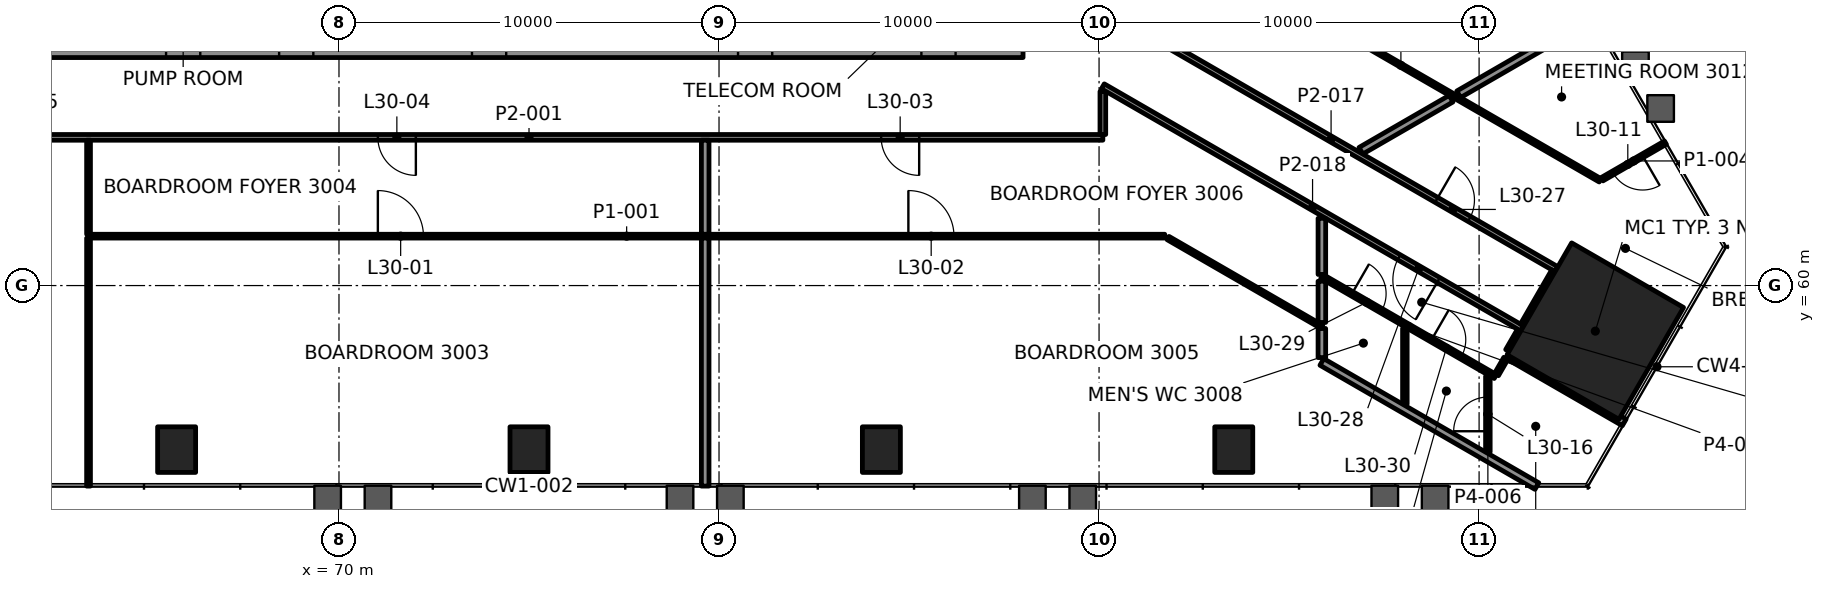
"""IFC4 building model, lengths in metres.
Left out: names, types, materials, properties, quantities, classifications, styles, units other than length and angle.
Written with IfcOpenShell. Run it as: python <this file> out.ifc"""

import sys

from ifc_helpers import new_model, si_unit, direction, frame, frame_2d, origin, origin_2d, place, context, subcontext, project, spatial, rectangle, extrude, element, fill, save


model = new_model("IFC4")
c1 = context("Model", 3, precision=1e-05, world=origin(), true_north=direction((0.0, 1.0)))
c2 = subcontext(c1, "Body", "Model", "MODEL_VIEW")
j1 = project(units=[si_unit("LENGTHUNIT", "METRE"), si_unit("PLANEANGLEUNIT", "RADIAN")], contexts=[c1])
p1 = place(None, origin())
s1 = spatial("IfcSite", under=j1, at=p1, CompositionType="ELEMENT")
p2 = place(p1, origin())
s2 = spatial("IfcBuilding", under=s1, at=p2, CompositionType="ELEMENT")
p3 = place(p2, frame((0.0, 0.0, 132.4)))
s3 = spatial("IfcBuildingStorey", under=s2, at=p3, CompositionType="ELEMENT", Elevation=132.4)
p4 = place(p3, frame((103.058, 58.801, 0.0), z_axis=(0.0, 0.0, 1.0), x_axis=(0.5, 0.866025403784, 0.0)))
e1 = element("IfcColumn", 1, at=p4, inside=s3, PredefinedType="COLUMN", context=c2, shape_type="SweptSolid", body=[
    extrude(rectangle(XDim=3.4, YDim=3.4, at=origin_2d()), origin(), (0.0, 0.0, 1.0), 4.2),
])
for number, where, z_axis, x_axis in (
    (2, (65.728, 55.683, -0.0), (0.0, 0.0, 1.0), (1.0, 0.0, 0.0)),
    (3, (75.0, 55.683, -0.0), (0.0, 0.0, 1.0), (1.0, 0.0, 0.0)),
    (4, (84.272, 55.683, -0.0), (0.0, 0.0, 1.0), (1.0, 0.0, 0.0)),
    (5, (93.545, 55.683, -0.0), (0.0, 0.0, 1.0), (1.0, 0.0, 0.0)),
):
    element("IfcColumn", number, at=place(p3, frame(where, z_axis=z_axis, x_axis=x_axis)), inside=s3, PredefinedType="COLUMN", context=c2, shape_type="SweptSolid", body=[
        extrude(rectangle(XDim=1.0, YDim=1.2, at=origin_2d()), origin(), (0.0, 0.0, 1.0), 4.2),
    ])
p5 = place(p3, frame((62.0, 66.45, 0.0), z_axis=(0.0, 0.0, 1.0), x_axis=(1.0, 0.0, 0.0)))
e6 = element("IfcWall", 6, at=p5, inside=s3, PredefinedType="SHEAR", context=c2, shape_type="SweptSolid", body=[
    extrude(rectangle(XDim=26.0, YDim=0.9, at=frame_2d((13.0, 0.0))), origin(), (0.0, 0.0, 1.0), 4.0),
])
p6 = place(p5, frame((3.45, 0.0, 0.0)))
e7 = element("IfcOpeningElement", 7, at=p6, cuts=e6, PredefinedType="OPENING", context=c2, shape_type="SweptSolid", body=[
    extrude(rectangle(XDim=0.9, YDim=2.1, at=frame_2d((0.45, 1.05))), frame((0.0, 0.46, 0.0), z_axis=(0.0, -1.0, 0.0), x_axis=(1.0, 0.0, 0.0)), (0.0, 0.0, 1.0), 0.92),
])
p7 = place(p5, frame((6.425, 0.0, 0.0)))
e8 = element("IfcOpeningElement", 8, at=p7, cuts=e6, PredefinedType="OPENING", context=c2, shape_type="SweptSolid", body=[
    extrude(rectangle(XDim=0.9, YDim=2.1, at=frame_2d((0.45, 1.05))), frame((0.0, 0.46, 0.0), z_axis=(0.0, -1.0, 0.0), x_axis=(1.0, 0.0, 0.0)), (0.0, 0.0, 1.0), 0.92),
])
p8 = place(p5, frame((11.5, 0.0, 0.0)))
e9 = element("IfcOpeningElement", 9, at=p8, cuts=e6, PredefinedType="OPENING", context=c2, shape_type="SweptSolid", body=[
    extrude(rectangle(XDim=0.9, YDim=2.1, at=frame_2d((0.45, 1.05))), frame((0.0, 0.46, 0.0), z_axis=(0.0, -1.0, 0.0), x_axis=(1.0, 0.0, 0.0)), (0.0, 0.0, 1.0), 0.92),
])
p9 = place(p5, frame((18.5, 0.0, 0.0)))
e10 = element("IfcOpeningElement", 10, at=p9, cuts=e6, PredefinedType="OPENING", context=c2, shape_type="SweptSolid", body=[
    extrude(rectangle(XDim=0.9, YDim=2.1, at=frame_2d((0.45, 1.05))), frame((0.0, 0.46, 0.0), z_axis=(0.0, -1.0, 0.0), x_axis=(1.0, 0.0, 0.0)), (0.0, 0.0, 1.0), 0.92),
])
p10 = place(p5, frame((23.325, 0.0, 0.0)))
e11 = element("IfcOpeningElement", 11, at=p10, cuts=e6, PredefinedType="OPENING", context=c2, shape_type="SweptSolid", body=[
    extrude(rectangle(XDim=0.9, YDim=2.1, at=frame_2d((0.45, 1.05))), frame((0.0, 0.46, 0.0), z_axis=(0.0, -1.0, 0.0), x_axis=(1.0, 0.0, 0.0)), (0.0, 0.0, 1.0), 0.92),
])
p11 = place(p3, frame((63.41, 61.3, 0.0), z_axis=(0.0, 0.0, 1.0), x_axis=(1.0, 0.0, 0.0)))
e12 = element("IfcWall", 12, at=p11, inside=s3, PredefinedType="PARTITIONING", context=c2, shape_type="SweptSolid", body=[
    extrude(rectangle(XDim=28.319, YDim=0.1, at=frame_2d((14.16, 0.0))), origin(), (0.0, 0.0, 1.0), 3.4),
])
p12 = place(p11, frame((7.613, 0.0, 0.0)))
e13 = element("IfcOpeningElement", 13, at=p12, cuts=e12, PredefinedType="OPENING", context=c2, shape_type="SweptSolid", body=[
    extrude(rectangle(XDim=1.2, YDim=2.1, at=frame_2d((0.6, 1.05))), frame((0.0, 0.06, 0.0), z_axis=(0.0, -1.0, 0.0), x_axis=(1.0, 0.0, 0.0)), (0.0, 0.0, 1.0), 0.12),
])
p13 = place(p11, frame((21.573, 0.0, 0.0)))
e14 = element("IfcOpeningElement", 14, at=p13, cuts=e12, PredefinedType="OPENING", context=c2, shape_type="SweptSolid", body=[
    extrude(rectangle(XDim=1.2, YDim=2.1, at=frame_2d((0.6, 1.05))), frame((0.0, 0.06, 0.0), z_axis=(0.0, -1.0, 0.0), x_axis=(1.0, 0.0, 0.0)), (0.0, 0.0, 1.0), 0.12),
])
p14 = place(p3, frame((90.1, 63.9, 0.0), z_axis=(0.0, 0.0, 1.0), x_axis=(-1.0, 0.0, 0.0)))
e15 = element("IfcWall", 15, at=p14, inside=s3, PredefinedType="PARTITIONING", context=c2, shape_type="SweptSolid", body=[
    extrude(rectangle(XDim=30.2, YDim=0.15, at=frame_2d((15.1, 0.0))), origin(), (0.0, 0.0, 1.0), 3.4),
])
p15 = place(p14, frame((4.833, 0.0, 0.0)))
e16 = element("IfcOpeningElement", 16, at=p15, cuts=e15, PredefinedType="OPENING", context=c2, shape_type="SweptSolid", body=[
    extrude(rectangle(XDim=1.0, YDim=2.1, at=frame_2d((0.5, 1.05))), frame((0.0, 0.085, 0.0), z_axis=(0.0, -1.0, 0.0), x_axis=(1.0, 0.0, 0.0)), (0.0, 0.0, 1.0), 0.17),
])
p16 = place(p14, frame((18.077, 0.0, 0.0)))
e17 = element("IfcOpeningElement", 17, at=p16, cuts=e15, PredefinedType="OPENING", context=c2, shape_type="SweptSolid", body=[
    extrude(rectangle(XDim=1.0, YDim=2.1, at=frame_2d((0.5, 1.05))), frame((0.0, 0.085, 0.0), z_axis=(0.0, -1.0, 0.0), x_axis=(1.0, 0.0, 0.0)), (0.0, 0.0, 1.0), 0.17),
])
p17 = place(p14, frame((27.893, 0.0, 0.0)))
e18 = element("IfcOpeningElement", 18, at=p17, cuts=e15, PredefinedType="OPENING", context=c2, shape_type="SweptSolid", body=[
    extrude(rectangle(XDim=0.9, YDim=2.1, at=frame_2d((0.45, 1.05))), frame((0.0, 0.085, 0.0), z_axis=(0.0, -1.0, 0.0), x_axis=(1.0, 0.0, 0.0)), (0.0, 0.0, 1.0), 0.17),
])
p18 = place(p3, frame((104.903, 63.761, 0.0), z_axis=(0.0, 0.0, 1.0), x_axis=(-0.86605048973, -0.49995654735, 0.0)))
e19 = element("IfcWall", 19, at=p18, inside=s3, PredefinedType="PARTITIONING", context=c2, shape_type="SweptSolid", body=[
    extrude(rectangle(XDim=1.926, YDim=0.1, at=frame_2d((0.963, 0.0))), origin(), (0.0, 0.0, 1.0), 3.4),
])
p19 = place(p18, frame((0.693, 0.0, 0.0)))
e20 = element("IfcOpeningElement", 20, at=p19, cuts=e19, PredefinedType="OPENING", context=c2, shape_type="SweptSolid", body=[
    extrude(rectangle(XDim=0.9, YDim=2.1, at=frame_2d((0.45, 1.05))), frame((0.0, 0.06, 0.0), z_axis=(0.0, -1.0, 0.0), x_axis=(1.0, 0.0, 0.0)), (0.0, 0.0, 1.0), 0.12),
])
p20 = place(p3, frame((96.89, 63.548, 0.0), z_axis=(0.0, 0.0, 1.0), x_axis=(0.86604168154, 0.499971805041, 0.0)))
e21 = element("IfcWall", 21, at=p20, inside=s3, PredefinedType="PARTITIONING", context=c2, shape_type="SweptSolid", body=[
    extrude(rectangle(XDim=2.74, YDim=0.2, at=frame_2d((1.37, 0.0))), origin(), (0.0, 0.0, 1.0), 3.4),
])
p21 = place(p3, frame((100.458, 57.658, 0.0), z_axis=(0.0, 0.0, 1.0), x_axis=(0.499895202697, 0.866085900082, 0.0)))
e22 = element("IfcWall", 22, at=p21, inside=s3, PredefinedType="PARTITIONING", context=c2, shape_type="SweptSolid", body=[
    extrude(rectangle(XDim=0.489, YDim=0.12, at=frame_2d((0.245, 0.0))), origin(), (0.0, 0.0, 1.0), 3.4),
])
p22 = place(p3, frame((100.786, 58.265, 0.0), z_axis=(0.0, 0.0, 1.0), x_axis=(0.499880341542, 0.866094477606, 0.0)))
e23 = element("IfcWall", 23, at=p22, inside=s3, PredefinedType="PARTITIONING", context=c2, shape_type="SweptSolid", body=[
    extrude(rectangle(XDim=0.625, YDim=0.2, at=frame_2d((0.312, 0.0))), origin(), (0.0, 0.0, 1.0), 3.4),
])
p23 = place(p3, frame((100.231, 55.623, 0.0), z_axis=(0.0, 0.0, 1.0), x_axis=(0.0, 1.0, 0.0)))
e24 = element("IfcWall", 24, at=p23, inside=s3, PredefinedType="PARTITIONING", context=c2, shape_type="SweptSolid", body=[
    extrude(rectangle(XDim=1.987, YDim=0.12, at=frame_2d((0.993, 0.0))), origin(), (0.0, 0.0, 1.0), 3.4),
])
p24 = place(p23, frame((0.543, 0.0, 0.0)))
e25 = element("IfcOpeningElement", 25, at=p24, cuts=e24, PredefinedType="OPENING", context=c2, shape_type="SweptSolid", body=[
    extrude(rectangle(XDim=0.9, YDim=2.1, at=frame_2d((0.45, 1.05))), frame((0.0, 0.07, 0.0), z_axis=(0.0, -1.0, 0.0), x_axis=(1.0, 0.0, 0.0)), (0.0, 0.0, 1.0), 0.14),
])
p25 = place(p3, frame((98.047, 56.884, 0.0), z_axis=(0.0, 0.0, 1.0), x_axis=(0.0, 1.0, 0.0)))
e26 = element("IfcWall", 26, at=p25, inside=s3, PredefinedType="PARTITIONING", context=c2, shape_type="SweptSolid", body=[
    extrude(rectangle(XDim=1.987, YDim=0.12, at=frame_2d((0.993, 0.0))), origin(), (0.0, 0.0, 1.0), 3.4),
])
p26 = place(p3, frame((95.863, 58.105, 0.0), z_axis=(0.0, 0.0, 1.0), x_axis=(0.0, 1.0, 0.0)))
e27 = element("IfcWall", 27, at=p26, inside=s3, PredefinedType="PARTITIONING", context=c2, shape_type="SweptSolid", body=[
    extrude(rectangle(XDim=0.765, YDim=0.2, at=frame_2d((0.383, 0.0))), origin(), (0.0, 0.0, 1.0), 3.4),
])
p27 = place(p3, frame((90.1, 63.975, 0.0), z_axis=(0.0, 0.0, 1.0), x_axis=(0.0, 1.0, 0.0)))
e28 = element("IfcWall", 28, at=p27, inside=s3, PredefinedType="PARTITIONING", context=c2, shape_type="SweptSolid", body=[
    extrude(rectangle(XDim=1.131, YDim=0.15, at=frame_2d((0.565, 0.0))), origin(), (0.0, 0.0, 1.0), 3.247),
])
p28 = place(p3, frame((79.636, 54.723, 0.0), z_axis=(0.0, 0.0, 1.0), x_axis=(0.0, 1.0, 0.0)))
e29 = element("IfcWall", 29, at=p28, inside=s3, PredefinedType="PARTITIONING", context=c2, shape_type="SweptSolid", body=[
    extrude(rectangle(XDim=6.527, YDim=0.2, at=frame_2d((3.264, 0.0))), origin(), (0.0, 0.0, 1.0), 3.165),
])
p29 = place(p3, frame((63.41, 54.723, 0.0), z_axis=(0.0, 0.0, 1.0), x_axis=(0.0, 1.0, 0.0)))
e30 = element("IfcWall", 30, at=p29, inside=s3, PredefinedType="PARTITIONING", context=c2, shape_type="SweptSolid", body=[
    extrude(rectangle(XDim=6.527, YDim=0.1, at=frame_2d((3.264, 0.0))), origin(), (0.0, 0.0, 1.0), 3.165),
])
p30 = place(p3, frame((103.185, 62.769, 0.0), z_axis=(0.0, 0.0, 1.0), x_axis=(-0.866024396652, 0.5000017444, 0.0)))
e31 = element("IfcWall", 31, at=p30, inside=s3, PredefinedType="PARTITIONING", context=c2, shape_type="SweptSolid", body=[
    extrude(rectangle(XDim=12.107, YDim=0.1, at=frame_2d((6.053, 0.0))), origin(), (0.0, 0.0, 1.0), 3.4),
])
p31 = place(p3, frame((90.175, 67.278, 0.0), z_axis=(0.0, 0.0, 1.0), x_axis=(0.866022903348, -0.500004330858, 0.0)))
e32 = element("IfcWall", 32, at=p31, inside=s3, PredefinedType="PARTITIONING", context=c2, shape_type="SweptSolid", body=[
    extrude(rectangle(XDim=13.695, YDim=0.15, at=frame_2d((6.848, 0.0))), origin(), (0.0, 0.0, 1.0), 3.4),
])
p32 = place(p31, frame((10.05, 0.0, 0.0)))
e33 = element("IfcOpeningElement", 33, at=p32, cuts=e32, PredefinedType="OPENING", context=c2, shape_type="SweptSolid", body=[
    extrude(rectangle(XDim=1.0, YDim=2.1, at=frame_2d((0.5, 1.05))), frame((0.0, 0.085, 0.0), z_axis=(0.0, -1.0, 0.0), x_axis=(1.0, 0.0, 0.0)), (0.0, 0.0, 1.0), 0.17),
])
p33 = place(p3, frame((101.136, 58.871, 0.0), z_axis=(0.0, 0.0, 1.0), x_axis=(-0.866020317169, 0.500008810174, 0.0)))
e34 = element("IfcWall", 34, at=p33, inside=s3, PredefinedType="PARTITIONING", context=c2, shape_type="SweptSolid", body=[
    extrude(rectangle(XDim=12.743, YDim=0.15, at=frame_2d((6.372, 0.0))), origin(), (0.0, 0.0, 1.0), 3.247),
])
p34 = place(p33, frame((2.546, 0.0, 0.0)))
e35 = element("IfcOpeningElement", 35, at=p34, cuts=e34, PredefinedType="OPENING", context=c2, shape_type="SweptSolid", body=[
    extrude(rectangle(XDim=1.2, YDim=2.1, at=frame_2d((0.6, 1.05))), frame((0.0, 0.085, 0.0), z_axis=(0.0, -1.0, 0.0), x_axis=(1.0, 0.0, 0.0)), (0.0, 0.0, 1.0), 0.17),
])
p35 = place(p3, frame((103.819, 56.398, 0.0), z_axis=(0.0, 0.0, 1.0), x_axis=(-0.866004308173, 0.500036536891, 0.0)))
e36 = element("IfcWall", 36, at=p35, inside=s3, PredefinedType="PARTITIONING", context=c2, shape_type="SweptSolid", body=[
    extrude(rectangle(XDim=3.544, YDim=0.2, at=frame_2d((1.772, 0.0))), origin(), (0.0, 0.0, 1.0), 3.4),
])
p36 = place(p3, frame((95.863, 60.241, 0.0), z_axis=(0.0, 0.0, 1.0), x_axis=(0.866028224559, -0.499995114243, 0.0)))
e37 = element("IfcWall", 37, at=p36, inside=s3, PredefinedType="PARTITIONING", context=c2, shape_type="SweptSolid", body=[
    extrude(rectangle(XDim=5.271, YDim=0.12, at=frame_2d((2.635, 0.0))), origin(), (0.0, 0.0, 1.0), 3.4),
])
p37 = place(p36, frame((0.913, 0.0, 0.0)))
e38 = element("IfcOpeningElement", 38, at=p37, cuts=e37, PredefinedType="OPENING", context=c2, shape_type="SweptSolid", body=[
    extrude(rectangle(XDim=0.9, YDim=2.1, at=frame_2d((0.45, 1.05))), frame((0.0, 0.07, 0.0), z_axis=(0.0, -1.0, 0.0), x_axis=(1.0, 0.0, 0.0)), (0.0, 0.0, 1.0), 0.14),
])
p38 = place(p36, frame((3.333, 0.0, 0.0)))
e39 = element("IfcOpeningElement", 39, at=p38, cuts=e37, PredefinedType="OPENING", context=c2, shape_type="SweptSolid", body=[
    extrude(rectangle(XDim=0.9, YDim=2.1, at=frame_2d((0.45, 1.05))), frame((0.0, 0.07, 0.0), z_axis=(0.0, -1.0, 0.0), x_axis=(1.0, 0.0, 0.0)), (0.0, 0.0, 1.0), 0.14),
])
p39 = place(p3, frame((95.863, 58.914, 0.0), z_axis=(0.0, 0.0, 1.0), x_axis=(-0.866042039906, 0.499971184285, 0.0)))
e40 = element("IfcWall", 40, at=p39, inside=s3, PredefinedType="PARTITIONING", context=c2, shape_type="SweptSolid", body=[
    extrude(rectangle(XDim=4.673, YDim=0.1, at=frame_2d((2.336, 0.0))), origin(), (0.0, 0.0, 1.0), 3.4),
])
p40 = place(p3, frame((101.521, 54.723, 0.0), z_axis=(0.0, 0.0, 1.0), x_axis=(-0.866020061583, 0.50000925285, 0.0)))
e41 = element("IfcWall", 41, at=p40, inside=s3, PredefinedType="PARTITIONING", context=c2, shape_type="SweptSolid", body=[
    extrude(rectangle(XDim=6.534, YDim=0.2, at=frame_2d((3.267, 0.0))), origin(), (0.0, 0.0, 1.0), 3.4),
])
p41 = place(p3, frame((79.636, 61.35, 0.0), z_axis=(0.0, 0.0, 1.0), x_axis=(0.0, 1.0, 0.0)))
e42 = element("IfcWall", 42, at=p41, inside=s3, PredefinedType="PARTITIONING", context=c2, shape_type="SweptSolid", body=[
    extrude(rectangle(XDim=2.475, YDim=0.2, at=frame_2d((1.237, 0.0))), origin(), (0.0, 0.0, 1.0), 3.4),
])
p42 = place(p3, frame((99.463, 65.033, 0.0), z_axis=(0.0, 0.0, 1.0), x_axis=(0.866014978466, 0.500018056747, 0.0)))
e43 = element("IfcWall", 43, at=p42, inside=s3, PredefinedType="PARTITIONING", context=c2, shape_type="SweptSolid", body=[
    extrude(rectangle(XDim=4.075, YDim=0.2, at=frame_2d((2.038, 0.0))), origin(), (0.0, 0.0, 1.0), 3.4),
])
p43 = place(p3, frame((101.174, 58.936, 0.0), z_axis=(0.0, 0.0, 1.0), x_axis=(0.499991515992, 0.866030301974, 0.0)))
e44 = element("IfcWall", 44, at=p43, inside=s3, PredefinedType="PARTITIONING", context=c2, shape_type="SweptSolid", body=[
    extrude(rectangle(XDim=1.649, YDim=0.2, at=frame_2d((0.825, 0.0))), origin(), (0.0, 0.0, 1.0), 3.247),
])
p44 = place(p3, frame((95.863, 60.293, 0.0), z_axis=(0.0, 0.0, 1.0), x_axis=(0.0, 1.0, 0.0)))
e45 = element("IfcWall", 45, at=p44, inside=s3, PredefinedType="PARTITIONING", context=c2, shape_type="SweptSolid", body=[
    extrude(rectangle(XDim=1.476, YDim=0.2, at=frame_2d((0.738, 0.0))), origin(), (0.0, 0.0, 1.0), 3.4),
])
p45 = place(p3, frame((63.41, 61.35, 0.0), z_axis=(0.0, 0.0, 1.0), x_axis=(0.0, 1.0, 0.0)))
e46 = element("IfcWall", 46, at=p45, inside=s3, PredefinedType="PARTITIONING", context=c2, shape_type="SweptSolid", body=[
    extrude(rectangle(XDim=2.475, YDim=0.1, at=frame_2d((1.237, 0.0))), origin(), (0.0, 0.0, 1.0), 3.4),
])
p46 = place(p3, frame((95.863, 59.029, 0.0), z_axis=(0.0, 0.0, 1.0), x_axis=(0.0, 1.0, 0.0)))
e47 = element("IfcWall", 47, at=p46, inside=s3, PredefinedType="PARTITIONING", context=c2, shape_type="SweptSolid", body=[
    extrude(rectangle(XDim=1.085, YDim=0.2, at=frame_2d((0.543, 0.0))), origin(), (0.0, 0.0, 1.0), 3.4),
])
p47 = place(p12, origin())
e48 = element("IfcDoor", 48, at=p47, inside=s3, OperationType="DOUBLE_DOOR_SINGLE_SWING", PredefinedType="DOOR", context=c2, shape_type="SweptSolid", body=[
    extrude(rectangle(XDim=1.2, YDim=2.1, at=frame_2d((0.6, 1.05))), frame((0.0, 0.025, 0.0), z_axis=(0.0, -1.0, 0.0), x_axis=(1.0, 0.0, 0.0)), (0.0, 0.0, 1.0), 0.05),
])
fill(e13, e48)
p48 = place(p13, origin())
e49 = element("IfcDoor", 49, at=p48, inside=s3, OperationType="DOUBLE_DOOR_SINGLE_SWING", PredefinedType="DOOR", context=c2, shape_type="SweptSolid", body=[
    extrude(rectangle(XDim=1.2, YDim=2.1, at=frame_2d((0.6, 1.05))), frame((0.0, 0.025, 0.0), z_axis=(0.0, -1.0, 0.0), x_axis=(1.0, 0.0, 0.0)), (0.0, 0.0, 1.0), 0.05),
])
fill(e14, e49)
p49 = place(p15, origin())
e50 = element("IfcDoor", 50, at=p49, inside=s3, OperationType="SINGLE_SWING_RIGHT", PredefinedType="DOOR", context=c2, shape_type="SweptSolid", body=[
    extrude(rectangle(XDim=1.0, YDim=2.1, at=frame_2d((0.5, 1.05))), frame((0.0, 0.025, 0.0), z_axis=(0.0, -1.0, 0.0), x_axis=(1.0, 0.0, 0.0)), (0.0, 0.0, 1.0), 0.05),
])
fill(e16, e50)
p50 = place(p16, origin())
e51 = element("IfcDoor", 51, at=p50, inside=s3, OperationType="SINGLE_SWING_RIGHT", PredefinedType="DOOR", context=c2, shape_type="SweptSolid", body=[
    extrude(rectangle(XDim=1.0, YDim=2.1, at=frame_2d((0.5, 1.05))), frame((0.0, 0.025, 0.0), z_axis=(0.0, -1.0, 0.0), x_axis=(1.0, 0.0, 0.0)), (0.0, 0.0, 1.0), 0.05),
])
fill(e17, e51)
p51 = place(p19, origin())
e52 = element("IfcDoor", 52, at=p51, inside=s3, OperationType="SINGLE_SWING_RIGHT", PredefinedType="DOOR", context=c2, shape_type="SweptSolid", body=[
    extrude(rectangle(XDim=0.9, YDim=2.1, at=frame_2d((0.45, 1.05))), frame((0.0, 0.025, 0.0), z_axis=(0.0, -1.0, 0.0), x_axis=(1.0, 0.0, 0.0)), (0.0, 0.0, 1.0), 0.05),
])
fill(e20, e52)
p52 = place(p24, origin())
e53 = element("IfcDoor", 53, at=p52, inside=s3, OperationType="SINGLE_SWING_LEFT", PredefinedType="DOOR", context=c2, shape_type="SweptSolid", body=[
    extrude(rectangle(XDim=0.9, YDim=2.1, at=frame_2d((0.45, 1.05))), frame((0.0, 0.025, 0.0), z_axis=(0.0, -1.0, 0.0), x_axis=(1.0, 0.0, 0.0)), (0.0, 0.0, 1.0), 0.05),
])
fill(e25, e53)
p53 = place(p32, origin())
e54 = element("IfcDoor", 54, at=p53, inside=s3, OperationType="SINGLE_SWING_LEFT", PredefinedType="DOOR", context=c2, shape_type="SweptSolid", body=[
    extrude(rectangle(XDim=1.0, YDim=2.1, at=frame_2d((0.5, 1.05))), frame((0.0, 0.025, 0.0), z_axis=(0.0, -1.0, 0.0), x_axis=(1.0, 0.0, 0.0)), (0.0, 0.0, 1.0), 0.05),
])
fill(e33, e54)
p54 = place(p34, origin())
e55 = element("IfcDoor", 55, at=p54, inside=s3, OperationType="DOUBLE_DOOR_SINGLE_SWING", PredefinedType="DOOR", context=c2, shape_type="SweptSolid", body=[
    extrude(rectangle(XDim=1.2, YDim=2.1, at=frame_2d((0.6, 1.05))), frame((0.0, 0.025, 0.0), z_axis=(0.0, -1.0, 0.0), x_axis=(1.0, 0.0, 0.0)), (0.0, 0.0, 1.0), 0.05),
])
fill(e35, e55)
p55 = place(p37, origin())
e56 = element("IfcDoor", 56, at=p55, inside=s3, OperationType="SINGLE_SWING_RIGHT", PredefinedType="DOOR", context=c2, shape_type="SweptSolid", body=[
    extrude(rectangle(XDim=0.9, YDim=2.1, at=frame_2d((0.45, 1.05))), frame((0.0, 0.025, 0.0), z_axis=(0.0, -1.0, 0.0), x_axis=(1.0, 0.0, 0.0)), (0.0, 0.0, 1.0), 0.05),
])
fill(e38, e56)
p56 = place(p38, origin())
e57 = element("IfcDoor", 57, at=p56, inside=s3, OperationType="SINGLE_SWING_LEFT", PredefinedType="DOOR", context=c2, shape_type="SweptSolid", body=[
    extrude(rectangle(XDim=0.9, YDim=2.1, at=frame_2d((0.45, 1.05))), frame((0.0, 0.025, 0.0), z_axis=(0.0, -1.0, 0.0), x_axis=(1.0, 0.0, 0.0)), (0.0, 0.0, 1.0), 0.05),
])
fill(e39, e57)
save(model, sys.argv[1])
